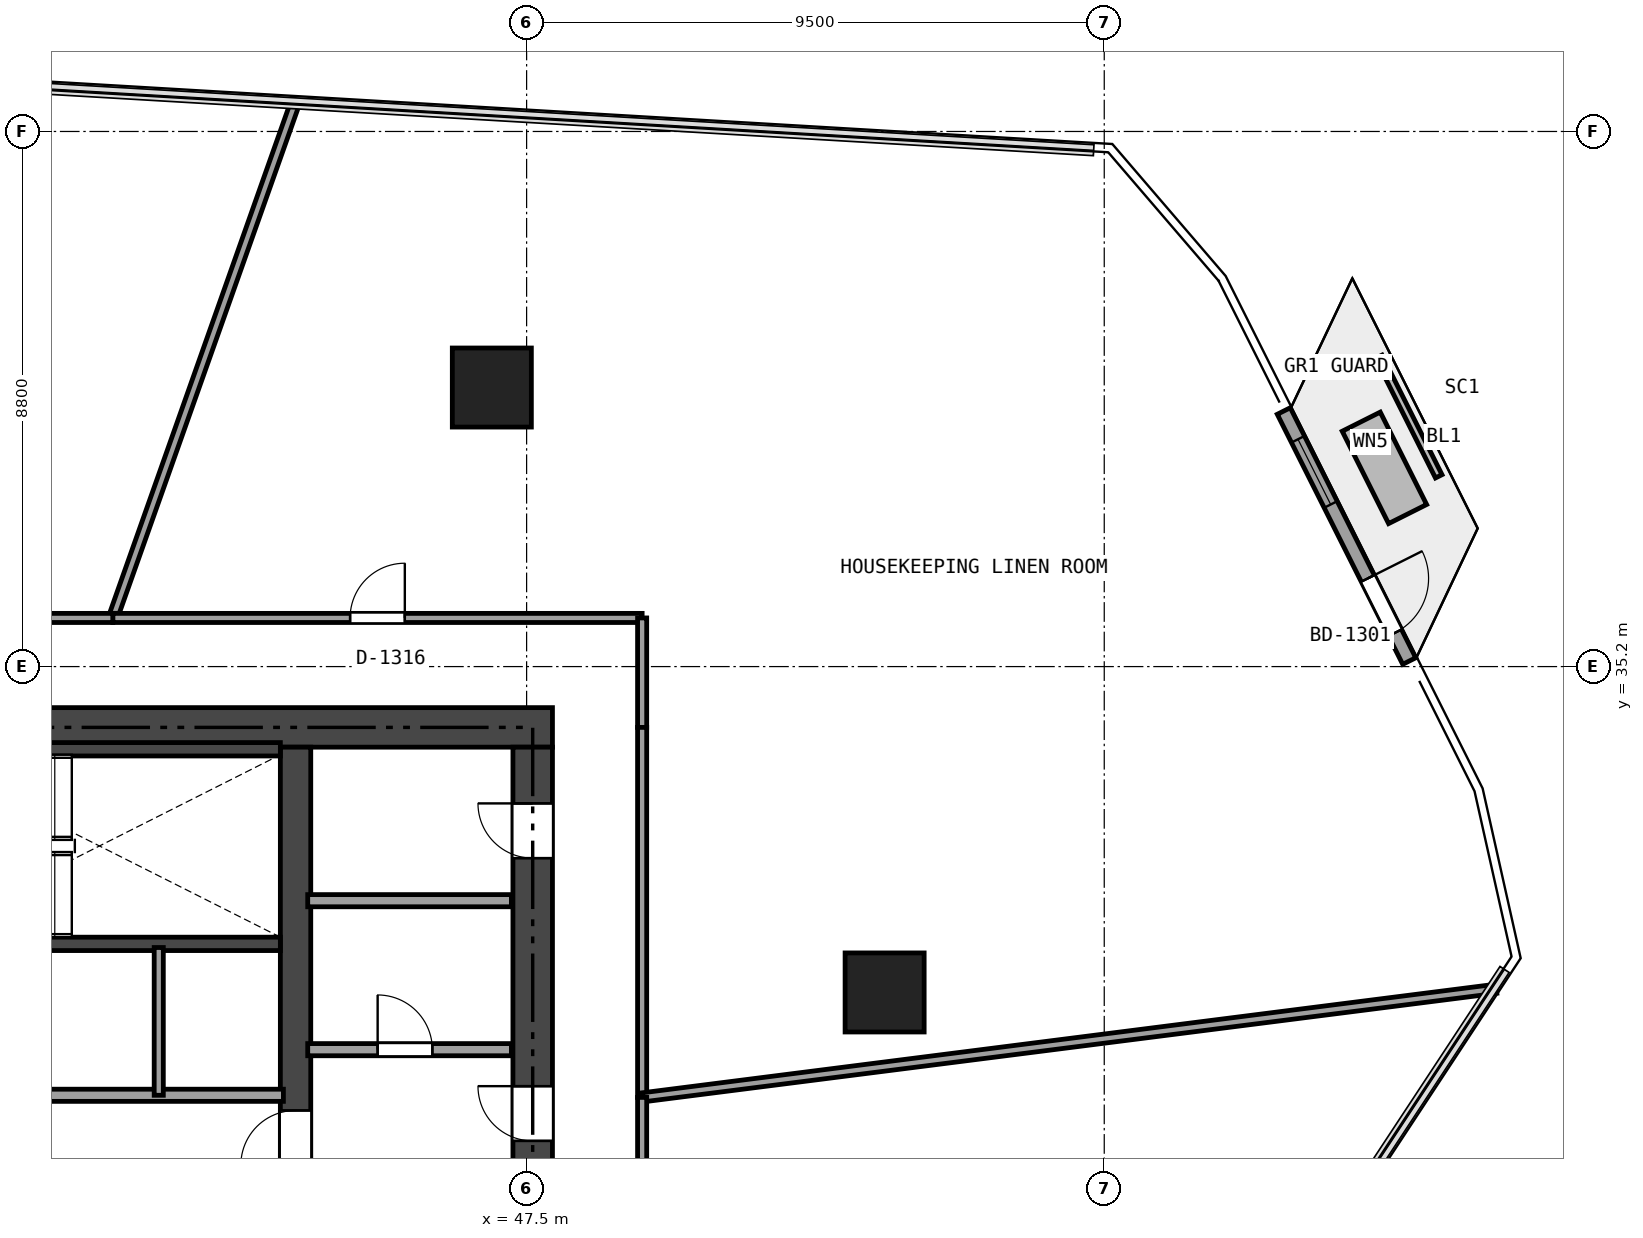
"""IFC4 building model, lengths in metres.
Left out: names, types, materials, properties, quantities, classifications, styles, units other than length and angle.
Written with IfcOpenShell. Run it as: python <this file> out.ifc"""

import sys

from ifc_helpers import new_model, si_unit, direction, frame, frame_2d, origin, origin_2d, place, context, subcontext, project, spatial, rectangle, extrude, element, fill, save


model = new_model("IFC4")
c1 = context("Model", 3, precision=1e-05, world=origin(), true_north=direction((0.0, 1.0)))
c2 = subcontext(c1, "Body", "Model", "MODEL_VIEW")
j1 = project(units=[si_unit("LENGTHUNIT", "METRE"), si_unit("PLANEANGLEUNIT", "RADIAN")], contexts=[c1])
p1 = place(None, origin())
s1 = spatial("IfcSite", under=j1, at=p1, CompositionType="ELEMENT")
p2 = place(p1, origin())
s2 = spatial("IfcBuilding", under=s1, at=p2, CompositionType="ELEMENT")
p3 = place(p2, frame((0.0, 0.0, 54.6)))
s3 = spatial("IfcBuildingStorey", under=s2, at=p3, CompositionType="ELEMENT", Elevation=54.6)
p4 = place(p3, frame((26.475, 34.2, 0.0), z_axis=(0.0, 0.0, 1.0), x_axis=(1.0, 0.0, 0.0)))
e1 = element("IfcWall", 1, at=p4, inside=s3, PredefinedType="SHEAR", context=c2, shape_type="SweptSolid", body=[
    extrude(rectangle(XDim=21.45, YDim=0.65, at=frame_2d((10.725, 0.0))), origin(), (0.0, 0.0, 1.0), 3.17),
])
p5 = place(p4, frame((9.725, 0.0, 0.0)))
e2 = element("IfcOpeningElement", 2, at=p5, cuts=e1, PredefinedType="OPENING", context=c2, shape_type="SweptSolid", body=[
    extrude(rectangle(XDim=1.1, YDim=2.15, at=frame_2d((0.55, 1.075))), frame((0.0, 0.335, 0.0), z_axis=(0.0, -1.0, 0.0), x_axis=(1.0, 0.0, 0.0)), (0.0, 0.0, 1.0), 0.67),
])
p6 = place(p4, frame((1.975, 0.0, 0.0)))
e3 = element("IfcOpeningElement", 3, at=p6, cuts=e1, PredefinedType="OPENING", context=c2, shape_type="SweptSolid", body=[
    extrude(rectangle(XDim=0.9, YDim=2.1, at=frame_2d((0.45, 1.05))), frame((0.0, 0.335, 0.0), z_axis=(0.0, -1.0, 0.0), x_axis=(1.0, 0.0, 0.0)), (0.0, 0.0, 1.0), 0.67),
])
p7 = place(p4, frame((6.275, 0.0, 0.0)))
e4 = element("IfcOpeningElement", 4, at=p7, cuts=e1, PredefinedType="OPENING", context=c2, shape_type="SweptSolid", body=[
    extrude(rectangle(XDim=0.9, YDim=2.1, at=frame_2d((0.45, 1.05))), frame((0.0, 0.335, 0.0), z_axis=(0.0, -1.0, 0.0), x_axis=(1.0, 0.0, 0.0)), (0.0, 0.0, 1.0), 0.67),
])
p8 = place(p3, frame((47.6, 18.925, 0.0), z_axis=(0.0, 0.0, 1.0), x_axis=(0.0, 1.0, 0.0)))
e5 = element("IfcWall", 5, at=p8, inside=s3, PredefinedType="SHEAR", context=c2, shape_type="SweptSolid", body=[
    extrude(rectangle(XDim=14.95, YDim=0.65, at=frame_2d((7.475, 0.0))), origin(), (0.0, 0.0, 1.0), 3.17),
])
p9 = place(p8, frame((6.575, 0.0, 0.0)))
e6 = element("IfcOpeningElement", 6, at=p9, cuts=e5, PredefinedType="OPENING", context=c2, shape_type="SweptSolid", body=[
    extrude(rectangle(XDim=1.1, YDim=2.15, at=frame_2d((0.55, 1.075))), frame((0.0, 0.335, 0.0), z_axis=(0.0, -1.0, 0.0), x_axis=(1.0, 0.0, 0.0)), (0.0, 0.0, 1.0), 0.67),
])
p10 = place(p8, frame((8.475, 0.0, 0.0)))
e7 = element("IfcOpeningElement", 7, at=p10, cuts=e5, PredefinedType="OPENING", context=c2, shape_type="SweptSolid", body=[
    extrude(rectangle(XDim=0.9, YDim=2.1, at=frame_2d((0.45, 1.05))), frame((0.0, 0.335, 0.0), z_axis=(0.0, -1.0, 0.0), x_axis=(1.0, 0.0, 0.0)), (0.0, 0.0, 1.0), 0.67),
])
p11 = place(p8, frame((13.125, 0.0, 0.0)))
e8 = element("IfcOpeningElement", 8, at=p11, cuts=e5, PredefinedType="OPENING", context=c2, shape_type="SweptSolid", body=[
    extrude(rectangle(XDim=0.9, YDim=2.1, at=frame_2d((0.45, 1.05))), frame((0.0, 0.335, 0.0), z_axis=(0.0, -1.0, 0.0), x_axis=(1.0, 0.0, 0.0)), (0.0, 0.0, 1.0), 0.67),
])
p12 = place(p3, frame((43.7, 18.925, 0.0), z_axis=(0.0, 0.0, 1.0), x_axis=(0.0, 1.0, 0.0)))
e9 = element("IfcWall", 9, at=p12, inside=s3, PredefinedType="SHEAR", context=c2, shape_type="SweptSolid", body=[
    extrude(rectangle(XDim=14.95, YDim=0.5, at=frame_2d((7.475, 0.0))), origin(), (0.0, 0.0, 1.0), 3.17),
])
p13 = place(p12, frame((8.075, 0.0, 0.0)))
e10 = element("IfcOpeningElement", 10, at=p13, cuts=e9, PredefinedType="OPENING", context=c2, shape_type="SweptSolid", body=[
    extrude(rectangle(XDim=0.9, YDim=2.1, at=frame_2d((0.45, 1.05))), frame((0.0, 0.26, 0.0), z_axis=(0.0, -1.0, 0.0), x_axis=(1.0, 0.0, 0.0)), (0.0, 0.0, 1.0), 0.52),
])
p14 = place(p3, frame((35.84, 30.64, 0.0), z_axis=(0.0, 0.0, 1.0), x_axis=(1.0, 0.0, 0.0)))
e11 = element("IfcWall", 11, at=p14, inside=s3, PredefinedType="SHEAR", context=c2, shape_type="SweptSolid", body=[
    extrude(rectangle(XDim=7.61, YDim=0.22, at=frame_2d((3.805, 0.0))), origin(), (0.0, 0.0, 1.0), 3.17),
])
p15 = place(p3, frame((37.55, 33.84, 0.0), z_axis=(0.0, 0.0, 1.0), x_axis=(1.0, 0.0, 0.0)))
e12 = element("IfcWall", 12, at=p15, inside=s3, PredefinedType="SHEAR", context=c2, shape_type="SweptSolid", body=[
    extrude(rectangle(XDim=5.9, YDim=0.22, at=frame_2d((2.95, 0.0))), origin(), (0.0, 0.0, 1.0), 3.17),
])
for number, where, z_axis, x_axis in (
    (13, (53.388, 29.841, 0.0), (0.0, 0.0, 1.0), (1.0, 0.0, 0.0)),
    (14, (46.928, 39.789, 0.0), (0.0, 0.0, 1.0), (1.0, 0.0, 0.0)),
):
    element("IfcColumn", number, at=place(p3, frame(where, z_axis=z_axis, x_axis=x_axis)), inside=s3, PredefinedType="COLUMN", context=c2, shape_type="SweptSolid", body=[
        extrude(rectangle(XDim=1.3, YDim=1.3, at=origin_2d()), origin(), (0.0, 0.0, 1.0), 3.17),
    ])
p16 = place(p3, frame((59.953, 39.403, 0.0), z_axis=(0.0, 0.0, 1.0), x_axis=(0.448465528008, -0.89380012877, 0.0)))
e15 = element("IfcWall", 15, at=p16, inside=s3, PredefinedType="SOLIDWALL", context=c2, shape_type="SweptSolid", body=[
    extrude(rectangle(XDim=4.601, YDim=0.24, at=frame_2d((2.3, 0.0))), origin(), (0.0, 0.0, 1.0), 3.17),
])
p17 = place(p16, frame((3.08, 0.0, 0.0)))
e16 = element("IfcOpeningElement", 16, at=p17, cuts=e15, PredefinedType="OPENING", context=c2, shape_type="SweptSolid", body=[
    extrude(rectangle(XDim=1.0, YDim=2.15, at=frame_2d((0.5, 1.075))), frame((0.0, 0.13, 0.0), z_axis=(0.0, -1.0, 0.0), x_axis=(1.0, 0.0, 0.0)), (0.0, 0.0, 1.0), 0.26),
])
p18 = place(p16, frame((0.52, 0.0, 0.2)))
e17 = element("IfcOpeningElement", 17, at=p18, cuts=e15, PredefinedType="OPENING", context=c2, shape_type="SweptSolid", body=[
    extrude(rectangle(XDim=1.2, YDim=1.8, at=frame_2d((0.6, 0.9))), frame((0.0, 0.13, 0.0), z_axis=(0.0, -1.0, 0.0), x_axis=(1.0, 0.0, 0.0)), (0.0, 0.0, 1.0), 0.26),
])
p19 = place(p3, frame((43.9, 28.9, 0.0), z_axis=(0.0, 0.0, 1.0), x_axis=(1.0, 0.0, 0.0)))
e18 = element("IfcWall", 18, at=p19, inside=s3, PredefinedType="SOLIDWALL", context=c2, shape_type="SweptSolid", body=[
    extrude(rectangle(XDim=3.35, YDim=0.2, at=frame_2d((1.675, 0.0))), origin(), (0.0, 0.0, 1.0), 3.17),
])
p20 = place(p19, frame((1.15, 0.0, 0.0)))
e19 = element("IfcOpeningElement", 19, at=p20, cuts=e18, PredefinedType="OPENING", context=c2, shape_type="SweptSolid", body=[
    extrude(rectangle(XDim=0.9, YDim=2.1, at=frame_2d((0.45, 1.05))), frame((0.0, 0.11, 0.0), z_axis=(0.0, -1.0, 0.0), x_axis=(1.0, 0.0, 0.0)), (0.0, 0.0, 1.0), 0.22),
])
p21 = place(p3, frame((43.9, 31.35, 0.0), z_axis=(0.0, 0.0, 1.0), x_axis=(1.0, 0.0, 0.0)))
e20 = element("IfcWall", 20, at=p21, inside=s3, PredefinedType="SOLIDWALL", context=c2, shape_type="SweptSolid", body=[
    extrude(rectangle(XDim=3.35, YDim=0.2, at=frame_2d((1.675, 0.0))), origin(), (0.0, 0.0, 1.0), 3.17),
])
p22 = place(p3, frame((35.62, 28.15, 0.0), z_axis=(0.0, 0.0, 1.0), x_axis=(1.0, 0.0, 0.0)))
e21 = element("IfcWall", 21, at=p22, inside=s3, PredefinedType="SOLIDWALL", context=c2, shape_type="SweptSolid", body=[
    extrude(rectangle(XDim=7.88, YDim=0.2, at=frame_2d((3.94, 0.0))), origin(), (0.0, 0.0, 1.0), 3.17),
])
p23 = place(p3, frame((41.45, 28.15, 0.0), z_axis=(0.0, 0.0, 1.0), x_axis=(0.0, 1.0, 0.0)))
e22 = element("IfcWall", 22, at=p23, inside=s3, PredefinedType="PARTITIONING", context=c2, shape_type="SweptSolid", body=[
    extrude(rectangle(XDim=2.43, YDim=0.15, at=frame_2d((1.215, 0.0))), origin(), (0.0, 0.0, 1.0), 3.17),
])
p24 = place(p3, frame((43.705, 44.505, 0.0), z_axis=(0.0, 0.0, 1.0), x_axis=(-0.333732929856, -0.942667667595, 0.0)))
e23 = element("IfcWall", 23, at=p24, inside=s3, PredefinedType="PARTITIONING", context=c2, shape_type="SweptSolid", body=[
    extrude(rectangle(XDim=9.022, YDim=0.15, at=frame_2d((4.511, 0.0))), origin(), (0.0, 0.0, 1.0), 2.355),
])
p25 = place(p3, frame((40.694, 36.0, 0.0), z_axis=(0.0, 0.0, 1.0), x_axis=(1.0, 0.0, 0.0)))
e24 = element("IfcWall", 24, at=p25, inside=s3, PredefinedType="PARTITIONING", context=c2, shape_type="SweptSolid", body=[
    extrude(rectangle(XDim=8.706, YDim=0.15, at=frame_2d((4.353, 0.0))), origin(), (0.0, 0.0, 1.0), 2.355),
])
p26 = place(p25, frame((3.903, 0.0, 0.0)))
e25 = element("IfcOpeningElement", 25, at=p26, cuts=e24, PredefinedType="OPENING", context=c2, shape_type="SweptSolid", body=[
    extrude(rectangle(XDim=0.9, YDim=2.0, at=frame_2d((0.45, 1.0))), frame((0.0, 0.085, 0.0), z_axis=(0.0, -1.0, 0.0), x_axis=(1.0, 0.0, 0.0)), (0.0, 0.0, 1.0), 0.17),
])
p27 = place(p3, frame((49.4, 36.0, 0.0), z_axis=(0.0, 0.0, 1.0), x_axis=(0.0, -1.0, 0.0)))
e26 = element("IfcWall", 26, at=p27, inside=s3, PredefinedType="PARTITIONING", context=c2, shape_type="SweptSolid", body=[
    extrude(rectangle(XDim=1.8, YDim=0.15, at=frame_2d((0.9, 0.0))), origin(), (0.0, 0.0, 1.0), 2.355),
])
p28 = place(p3, frame((49.4, 34.2, 0.0), z_axis=(0.0, 0.0, 1.0), x_axis=(0.0, -1.0, 0.0)))
e27 = element("IfcWall", 27, at=p28, inside=s3, PredefinedType="PARTITIONING", context=c2, shape_type="SweptSolid", body=[
    extrude(rectangle(XDim=6.085, YDim=0.15, at=frame_2d((3.042, 0.0))), origin(), (0.0, 0.0, 1.0), 2.395),
])
p29 = place(p3, frame((49.4, 28.115, 0.0), z_axis=(0.0, 0.0, 1.0), x_axis=(0.992004152997, 0.126205231415, 0.0)))
e28 = element("IfcWall", 28, at=p29, inside=s3, PredefinedType="PARTITIONING", context=c2, shape_type="SweptSolid", body=[
    extrude(rectangle(XDim=14.16, YDim=0.15, at=frame_2d((7.08, 0.0))), origin(), (0.0, 0.0, 1.0), 2.355),
])
p30 = place(p3, frame((27.929, 36.0, 0.0), z_axis=(0.0, 0.0, 1.0), x_axis=(1.0, 0.0, 0.0)))
e29 = element("IfcWall", 29, at=p30, inside=s3, PredefinedType="PARTITIONING", context=c2, shape_type="SweptSolid", body=[
    extrude(rectangle(XDim=12.765, YDim=0.15, at=frame_2d((6.383, 0.0))), origin(), (0.0, 0.0, 1.0), 2.395),
])
p31 = place(p30, frame((5.908, 0.0, 0.0)))
e30 = element("IfcOpeningElement", 30, at=p31, cuts=e29, PredefinedType="OPENING", context=c2, shape_type="SweptSolid", body=[
    extrude(rectangle(XDim=0.95, YDim=2.15, at=frame_2d((0.475, 1.075))), frame((0.0, 0.085, 0.0), z_axis=(0.0, -1.0, 0.0), x_axis=(1.0, 0.0, 0.0)), (0.0, 0.0, 1.0), 0.17),
])
p32 = place(p3, frame((49.4, 28.115, 0.0), z_axis=(0.0, 0.0, 1.0), x_axis=(0.0, -1.0, 0.0)))
e31 = element("IfcWall", 31, at=p32, inside=s3, PredefinedType="PARTITIONING", context=c2, shape_type="SweptSolid", body=[
    extrude(rectangle(XDim=9.515, YDim=0.15, at=frame_2d((4.757, 0.0))), origin(), (0.0, 0.0, 1.0), 2.395),
])
p33 = place(p32, frame((4.282, 0.0, 0.0)))
e32 = element("IfcOpeningElement", 32, at=p33, cuts=e31, PredefinedType="OPENING", context=c2, shape_type="SweptSolid", body=[
    extrude(rectangle(XDim=0.95, YDim=2.15, at=frame_2d((0.475, 1.075))), frame((0.0, 0.085, 0.0), z_axis=(0.0, -1.0, 0.0), x_axis=(1.0, 0.0, 0.0)), (0.0, 0.0, 1.0), 0.17),
])
p34 = place(p17, origin())
e33 = element("IfcDoor", 33, at=p34, inside=s3, OperationType="SINGLE_SWING_LEFT", PredefinedType="DOOR", context=c2, shape_type="SweptSolid", body=[
    extrude(rectangle(XDim=1.0, YDim=2.15, at=frame_2d((0.5, 1.075))), frame((0.0, 0.025, 0.0), z_axis=(0.0, -1.0, 0.0), x_axis=(1.0, 0.0, 0.0)), (0.0, 0.0, 1.0), 0.05),
])
fill(e16, e33)
p35 = place(p18, origin())
e34 = element("IfcWindow", 34, at=p35, inside=s3, PartitioningType="SINGLE_PANEL", PredefinedType="WINDOW", context=c2, shape_type="SweptSolid", body=[
    extrude(rectangle(XDim=1.2, YDim=1.8, at=frame_2d((0.6, 0.9))), frame((0.0, 0.03, 0.0), z_axis=(0.0, -1.0, 0.0), x_axis=(1.0, 0.0, 0.0)), (0.0, 0.0, 1.0), 0.06),
])
fill(e17, e34)
p36 = place(p13, origin())
e35 = element("IfcDoor", 35, at=p36, inside=s3, OperationType="SINGLE_SWING_LEFT", PredefinedType="DOOR", context=c2, shape_type="SweptSolid", body=[
    extrude(rectangle(XDim=0.9, YDim=2.1, at=frame_2d((0.45, 1.05))), frame((0.0, 0.025, 0.0), z_axis=(0.0, -1.0, 0.0), x_axis=(1.0, 0.0, 0.0)), (0.0, 0.0, 1.0), 0.05),
])
fill(e10, e35)
p37 = place(p10, origin())
e36 = element("IfcDoor", 36, at=p37, inside=s3, OperationType="SINGLE_SWING_RIGHT", PredefinedType="DOOR", context=c2, shape_type="SweptSolid", body=[
    extrude(rectangle(XDim=0.9, YDim=2.1, at=frame_2d((0.45, 1.05))), frame((0.0, 0.025, 0.0), z_axis=(0.0, -1.0, 0.0), x_axis=(1.0, 0.0, 0.0)), (0.0, 0.0, 1.0), 0.05),
])
fill(e7, e36)
p38 = place(p20, origin())
e37 = element("IfcDoor", 37, at=p38, inside=s3, OperationType="SINGLE_SWING_LEFT", PredefinedType="DOOR", context=c2, shape_type="SweptSolid", body=[
    extrude(rectangle(XDim=0.9, YDim=2.1, at=frame_2d((0.45, 1.05))), frame((0.0, 0.025, 0.0), z_axis=(0.0, -1.0, 0.0), x_axis=(1.0, 0.0, 0.0)), (0.0, 0.0, 1.0), 0.05),
])
fill(e19, e37)
p39 = place(p11, origin())
e38 = element("IfcDoor", 38, at=p39, inside=s3, OperationType="SINGLE_SWING_RIGHT", PredefinedType="DOOR", context=c2, shape_type="SweptSolid", body=[
    extrude(rectangle(XDim=0.9, YDim=2.1, at=frame_2d((0.45, 1.05))), frame((0.0, 0.025, 0.0), z_axis=(0.0, -1.0, 0.0), x_axis=(1.0, 0.0, 0.0)), (0.0, 0.0, 1.0), 0.05),
])
fill(e8, e38)
p40 = place(p26, origin())
e39 = element("IfcDoor", 39, at=p40, inside=s3, OperationType="SINGLE_SWING_RIGHT", PredefinedType="DOOR", context=c2, shape_type="SweptSolid", body=[
    extrude(rectangle(XDim=0.9, YDim=2.0, at=frame_2d((0.45, 1.0))), frame((0.0, 0.025, 0.0), z_axis=(0.0, -1.0, 0.0), x_axis=(1.0, 0.0, 0.0)), (0.0, 0.0, 1.0), 0.05),
])
fill(e25, e39)
save(model, sys.argv[1])
